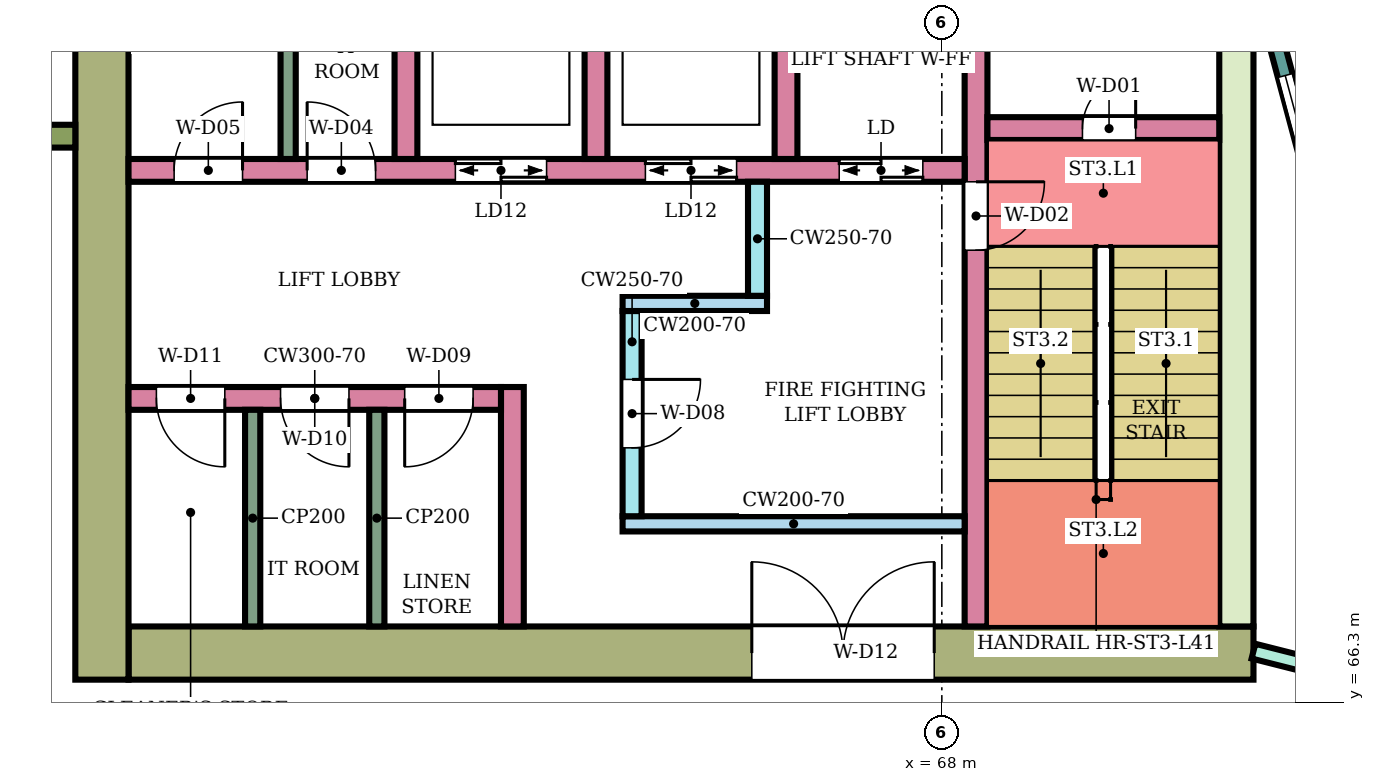
"""IFC4 building model, lengths in metres.
Left out: names, types, materials, properties, quantities, classifications, styles, units other than length and angle.
Written with IfcOpenShell. Run it as: python <this file> out.ifc"""

import sys

from ifc_helpers import new_model, si_unit, direction, frame, frame_2d, origin, place, context, subcontext, project, spatial, rectangle, extrude, element, fill, save


model = new_model("IFC4")
c1 = context("Model", 3, precision=1e-05, world=origin(), true_north=direction((0.0, 1.0)))
c2 = subcontext(c1, "Body", "Model", "MODEL_VIEW")
j1 = project(units=[si_unit("LENGTHUNIT", "METRE"), si_unit("PLANEANGLEUNIT", "RADIAN")], contexts=[c1])
p1 = place(None, origin())
s1 = spatial("IfcSite", under=j1, at=p1, CompositionType="ELEMENT")
p2 = place(p1, origin())
s2 = spatial("IfcBuilding", under=s1, at=p2, CompositionType="ELEMENT")
p3 = place(p2, frame((0.0, 0.0, 178.2)))
s3 = spatial("IfcBuildingStorey", under=s2, at=p3, CompositionType="ELEMENT", Elevation=178.2)
p4 = place(p3, frame((72.1, 66.95, 0.0), z_axis=(0.0, 0.0, 1.0), x_axis=(-1.0, 0.0, 0.0)))
e1 = element("IfcWall", 1, at=p4, inside=s3, PredefinedType="SHEAR", context=c2, shape_type="SweptSolid", body=[
    extrude(rectangle(XDim=14.8, YDim=0.7, at=frame_2d((7.4, 0.0))), origin(), (0.0, 0.0, 1.0), 3.78),
])
p5 = place(p4, frame((4.2, 0.0, 0.0)))
e2 = element("IfcOpeningElement", 2, at=p5, cuts=e1, PredefinedType="OPENING", context=c2, shape_type="SweptSolid", body=[
    extrude(rectangle(XDim=2.4, YDim=2.4, at=frame_2d((1.2, 1.2))), frame((0.0, 0.36, 0.0), z_axis=(0.0, -1.0, 0.0), x_axis=(1.0, 0.0, 0.0)), (0.0, 0.0, 1.0), 0.72),
])
p6 = place(p3, frame((71.875, 75.0, 0.0), z_axis=(0.0, 0.0, 1.0), x_axis=(0.0, -1.0, 0.0)))
e3 = element("IfcWall", 3, at=p6, inside=s3, PredefinedType="SHEAR", context=c2, shape_type="SweptSolid", body=[
    extrude(rectangle(XDim=7.7, YDim=0.45, at=frame_2d((3.85, 0.0))), origin(), (0.0, 0.0, 1.0), 3.78),
])
p7 = place(p3, frame((56.95, 83.4, 0.0), z_axis=(0.0, 0.0, 1.0), x_axis=(0.0, -1.0, 0.0)))
e4 = element("IfcWall", 4, at=p7, inside=s3, PredefinedType="SHEAR", context=c2, shape_type="SweptSolid", body=[
    extrude(rectangle(XDim=16.8, YDim=0.7, at=frame_2d((8.4, 0.0))), origin(), (0.0, 0.0, 1.0), 3.78),
])
p8 = place(p3, frame((68.45, 75.0, 0.0), z_axis=(0.0, 0.0, 1.0), x_axis=(0.0, -1.0, 0.0)))
e5 = element("IfcWall", 5, at=p8, inside=s3, PredefinedType="SHEAR", context=c2, shape_type="SweptSolid", body=[
    extrude(rectangle(XDim=7.7, YDim=0.3, at=frame_2d((3.85, 0.0))), origin(), (0.0, 0.0, 1.0), 3.78),
])
p9 = place(p8, frame((1.85, 0.0, 0.0)))
e6 = element("IfcOpeningElement", 6, at=p9, cuts=e5, PredefinedType="OPENING", context=c2, shape_type="SweptSolid", body=[
    extrude(rectangle(XDim=0.9, YDim=2.1, at=frame_2d((0.45, 1.05))), frame((0.0, 0.16, 0.0), z_axis=(0.0, -1.0, 0.0), x_axis=(1.0, 0.0, 0.0)), (0.0, 0.0, 1.0), 0.32),
])
p10 = place(p3, frame((71.65, 73.85, 0.0), z_axis=(0.0, 0.0, 1.0), x_axis=(-1.0, 0.0, 0.0)))
e7 = element("IfcWall", 7, at=p10, inside=s3, PredefinedType="SHEAR", context=c2, shape_type="SweptSolid", body=[
    extrude(rectangle(XDim=3.05, YDim=0.3, at=frame_2d((1.525, 0.0))), origin(), (0.0, 0.0, 1.0), 3.78),
])
p11 = place(p10, frame((1.1, 0.0, 0.0)))
e8 = element("IfcOpeningElement", 8, at=p11, cuts=e7, PredefinedType="OPENING", context=c2, shape_type="SweptSolid", body=[
    extrude(rectangle(XDim=0.7, YDim=2.0, at=frame_2d((0.35, 1.0))), frame((0.0, 0.16, 0.0), z_axis=(0.0, -1.0, 0.0), x_axis=(1.0, 0.0, 0.0)), (0.0, 0.0, 1.0), 0.32),
])
p12 = place(p3, frame((68.3, 73.3, 0.0), z_axis=(0.0, 0.0, 1.0), x_axis=(-1.0, 0.0, 0.0)))
e9 = element("IfcWall", 9, at=p12, inside=s3, PredefinedType="SHEAR", context=c2, shape_type="SweptSolid", body=[
    extrude(rectangle(XDim=11.0, YDim=0.3, at=frame_2d((5.5, 0.0))), origin(), (0.0, 0.0, 1.0), 3.78),
])
p13 = place(p12, frame((0.55, 0.0, 0.0)))
e10 = element("IfcOpeningElement", 10, at=p13, cuts=e9, PredefinedType="OPENING", context=c2, shape_type="SweptSolid", body=[
    extrude(rectangle(XDim=1.1, YDim=2.1, at=frame_2d((0.55, 1.05))), frame((0.0, 0.16, 0.0), z_axis=(0.0, -1.0, 0.0), x_axis=(1.0, 0.0, 0.0)), (0.0, 0.0, 1.0), 0.32),
])
p14 = place(p12, frame((3.0, 0.0, 0.0)))
e11 = element("IfcOpeningElement", 11, at=p14, cuts=e9, PredefinedType="OPENING", context=c2, shape_type="SweptSolid", body=[
    extrude(rectangle(XDim=1.2, YDim=2.1, at=frame_2d((0.6, 1.05))), frame((0.0, 0.16, 0.0), z_axis=(0.0, -1.0, 0.0), x_axis=(1.0, 0.0, 0.0)), (0.0, 0.0, 1.0), 0.32),
])
p15 = place(p12, frame((5.5, 0.0, 0.0)))
e12 = element("IfcOpeningElement", 12, at=p15, cuts=e9, PredefinedType="OPENING", context=c2, shape_type="SweptSolid", body=[
    extrude(rectangle(XDim=1.2, YDim=2.1, at=frame_2d((0.6, 1.05))), frame((0.0, 0.16, 0.0), z_axis=(0.0, -1.0, 0.0), x_axis=(1.0, 0.0, 0.0)), (0.0, 0.0, 1.0), 0.32),
])
p16 = place(p12, frame((7.75, 0.0, 0.0)))
e13 = element("IfcOpeningElement", 13, at=p16, cuts=e9, PredefinedType="OPENING", context=c2, shape_type="SweptSolid", body=[
    extrude(rectangle(XDim=0.9, YDim=2.1, at=frame_2d((0.45, 1.05))), frame((0.0, 0.16, 0.0), z_axis=(0.0, -1.0, 0.0), x_axis=(1.0, 0.0, 0.0)), (0.0, 0.0, 1.0), 0.32),
])
p17 = place(p12, frame((9.5, 0.0, 0.0)))
e14 = element("IfcOpeningElement", 14, at=p17, cuts=e9, PredefinedType="OPENING", context=c2, shape_type="SweptSolid", body=[
    extrude(rectangle(XDim=0.9, YDim=2.1, at=frame_2d((0.45, 1.05))), frame((0.0, 0.16, 0.0), z_axis=(0.0, -1.0, 0.0), x_axis=(1.0, 0.0, 0.0)), (0.0, 0.0, 1.0), 0.32),
])
for number, where, z_axis, x_axis in (
    (15, (65.95, 76.0, 0.0), (0.0, 0.0, 1.0), (0.0, -1.0, 0.0)),
    (16, (63.45, 76.0, 0.0), (0.0, 0.0, 1.0), (0.0, -1.0, 0.0)),
    (17, (60.95, 76.0, 0.0), (0.0, 0.0, 1.0), (0.0, -1.0, 0.0)),
):
    element("IfcWall", number, at=place(p3, frame(where, z_axis=z_axis, x_axis=x_axis)), inside=s3, PredefinedType="SHEAR", context=c2, shape_type="SweptSolid", body=[
        extrude(rectangle(XDim=2.55, YDim=0.3, at=frame_2d((1.275, 0.0))), origin(), (0.0, 0.0, 1.0), 3.78),
    ])
p18 = place(p3, frame((68.3, 68.65, 0.0), z_axis=(0.0, 0.0, 1.0), x_axis=(-1.0, 0.0, 0.0)))
e18 = element("IfcWall", 18, at=p18, inside=s3, PredefinedType="SHEAR", context=c2, shape_type="SweptSolid", body=[
    extrude(rectangle(XDim=4.5, YDim=0.2, at=frame_2d((2.25, 0.0))), origin(), (0.0, 0.0, 1.0), 3.78),
])
p19 = place(p3, frame((63.925, 71.45, 0.0), z_axis=(0.0, 0.0, 1.0), x_axis=(0.0, -1.0, 0.0)))
e19 = element("IfcWall", 19, at=p19, inside=s3, PredefinedType="SHEAR", context=c2, shape_type="SweptSolid", body=[
    extrude(rectangle(XDim=2.7, YDim=0.25, at=frame_2d((1.35, 0.0))), origin(), (0.0, 0.0, 1.0), 3.78),
])
p20 = place(p19, frame((0.9, 0.0, 0.0)))
e20 = element("IfcOpeningElement", 20, at=p20, cuts=e19, PredefinedType="OPENING", context=c2, shape_type="SweptSolid", body=[
    extrude(rectangle(XDim=0.9, YDim=2.1, at=frame_2d((0.45, 1.05))), frame((0.0, 0.135, 0.0), z_axis=(0.0, -1.0, 0.0), x_axis=(1.0, 0.0, 0.0)), (0.0, 0.0, 1.0), 0.27),
])
p21 = place(p3, frame((65.7, 71.55, 0.0), z_axis=(0.0, 0.0, 1.0), x_axis=(-1.0, 0.0, 0.0)))
e21 = element("IfcWall", 21, at=p21, inside=s3, PredefinedType="SHEAR", context=c2, shape_type="SweptSolid", body=[
    extrude(rectangle(XDim=1.9, YDim=0.2, at=frame_2d((0.95, 0.0))), origin(), (0.0, 0.0, 1.0), 3.78),
])
p22 = place(p3, frame((65.575, 73.15, 0.0), z_axis=(0.0, 0.0, 1.0), x_axis=(0.0, -1.0, 0.0)))
e22 = element("IfcWall", 22, at=p22, inside=s3, PredefinedType="SHEAR", context=c2, shape_type="SweptSolid", body=[
    extrude(rectangle(XDim=1.5, YDim=0.25, at=frame_2d((0.75, 0.0))), origin(), (0.0, 0.0, 1.0), 3.78),
])
p23 = place(p3, frame((62.35, 70.45, 0.0), z_axis=(0.0, 0.0, 1.0), x_axis=(0.0, -1.0, 0.0)))
e23 = element("IfcWall", 23, at=p23, inside=s3, PredefinedType="SHEAR", context=c2, shape_type="SweptSolid", body=[
    extrude(rectangle(XDim=3.15, YDim=0.3, at=frame_2d((1.575, 0.0))), origin(), (0.0, 0.0, 1.0), 3.78),
])
p24 = place(p3, frame((62.2, 70.3, 0.0), z_axis=(0.0, 0.0, 1.0), x_axis=(-1.0, 0.0, 0.0)))
e24 = element("IfcWall", 24, at=p24, inside=s3, PredefinedType="SHEAR", context=c2, shape_type="SweptSolid", body=[
    extrude(rectangle(XDim=4.9, YDim=0.3, at=frame_2d((2.45, 0.0))), origin(), (0.0, 0.0, 1.0), 3.78),
])
p25 = place(p24, frame((0.367, 0.0, 0.0)))
e25 = element("IfcOpeningElement", 25, at=p25, cuts=e24, PredefinedType="OPENING", context=c2, shape_type="SweptSolid", body=[
    extrude(rectangle(XDim=0.9, YDim=2.1, at=frame_2d((0.45, 1.05))), frame((0.0, 0.16, 0.0), z_axis=(0.0, -1.0, 0.0), x_axis=(1.0, 0.0, 0.0)), (0.0, 0.0, 1.0), 0.32),
])
p26 = place(p24, frame((2.0, 0.0, 0.0)))
e26 = element("IfcOpeningElement", 26, at=p26, cuts=e24, PredefinedType="OPENING", context=c2, shape_type="SweptSolid", body=[
    extrude(rectangle(XDim=0.9, YDim=2.1, at=frame_2d((0.45, 1.05))), frame((0.0, 0.16, 0.0), z_axis=(0.0, -1.0, 0.0), x_axis=(1.0, 0.0, 0.0)), (0.0, 0.0, 1.0), 0.32),
])
p27 = place(p24, frame((3.633, 0.0, 0.0)))
e27 = element("IfcOpeningElement", 27, at=p27, cuts=e24, PredefinedType="OPENING", context=c2, shape_type="SweptSolid", body=[
    extrude(rectangle(XDim=0.9, YDim=2.1, at=frame_2d((0.45, 1.05))), frame((0.0, 0.16, 0.0), z_axis=(0.0, -1.0, 0.0), x_axis=(1.0, 0.0, 0.0)), (0.0, 0.0, 1.0), 0.32),
])
p28 = place(p3, frame((56.6, 73.75, 0.0), z_axis=(0.0, 0.0, 1.0), x_axis=(-1.0, 0.0, 0.0)))
e28 = element("IfcWall", 28, at=p28, inside=s3, PredefinedType="NOTDEFINED", context=c2, shape_type="SweptSolid", body=[
    extrude(rectangle(XDim=2.416, YDim=0.3, at=frame_2d((1.208, 0.0))), origin(), (0.0, 0.0, 1.0), 4.1),
])
p29 = place(p3, frame((72.396, 75.0, 0.0), z_axis=(0.0, 0.0, 1.0), x_axis=(0.258789828301, -0.965933654434, 0.0)))
e29 = element("IfcWall", 29, at=p29, inside=s3, PredefinedType="NOTDEFINED", context=c2, shape_type="SweptSolid", body=[
    extrude(rectangle(XDim=3.936, YDim=0.2, at=frame_2d((1.968, 0.0))), origin(), (0.0, 0.0, 1.0), 4.1),
])
p30 = place(p29, frame((0.468, 0.0, 0.9)))
e30 = element("IfcOpeningElement", 30, at=p30, cuts=e29, PredefinedType="OPENING", context=c2, shape_type="SweptSolid", body=[
    extrude(rectangle(XDim=3.0, YDim=2.3, at=frame_2d((1.5, 1.15))), frame((0.0, 0.11, 0.0), z_axis=(0.0, -1.0, 0.0), x_axis=(1.0, 0.0, 0.0)), (0.0, 0.0, 1.0), 0.22),
])
p31 = place(p3, frame((72.1, 66.975, 0.0), z_axis=(0.0, 0.0, 1.0), x_axis=(0.969471314457, -0.245204752086, 0.0)))
e31 = element("IfcWall", 31, at=p31, inside=s3, PredefinedType="PARTITIONING", context=c2, shape_type="SweptSolid", body=[
    extrude(rectangle(XDim=2.582, YDim=0.2, at=frame_2d((1.291, 0.0))), origin(), (0.0, 0.0, 1.0), 3.65),
])
p32 = place(p31, frame((0.841, 0.0, 0.0)))
e32 = element("IfcOpeningElement", 32, at=p32, cuts=e31, PredefinedType="OPENING", context=c2, shape_type="SweptSolid", body=[
    extrude(rectangle(XDim=0.9, YDim=2.1, at=frame_2d((0.45, 1.05))), frame((0.0, 0.11, 0.0), z_axis=(0.0, -1.0, 0.0), x_axis=(1.0, 0.0, 0.0)), (0.0, 0.0, 1.0), 0.22),
])
p33 = place(p3, frame((59.4, 76.0, 0.0), z_axis=(0.0, 0.0, 1.0), x_axis=(0.0, -1.0, 0.0)))
e33 = element("IfcWall", 33, at=p33, inside=s3, PredefinedType="PARTITIONING", context=c2, shape_type="SweptSolid", body=[
    extrude(rectangle(XDim=2.55, YDim=0.2, at=frame_2d((1.275, 0.0))), origin(), (0.0, 0.0, 1.0), 3.78),
])
for number, where, z_axis, x_axis in (
    (34, (60.567, 70.15, 0.0), (0.0, 0.0, 1.0), (0.0, -1.0, 0.0)),
    (35, (58.933, 70.15, 0.0), (0.0, 0.0, 1.0), (0.0, -1.0, 0.0)),
):
    element("IfcWall", number, at=place(p3, frame(where, z_axis=z_axis, x_axis=x_axis)), inside=s3, PredefinedType="PARTITIONING", context=c2, shape_type="SweptSolid", body=[
        extrude(rectangle(XDim=2.85, YDim=0.2, at=frame_2d((1.425, 0.0))), origin(), (0.0, 0.0, 1.0), 3.78),
    ])
p34 = place(p30, origin())
e36 = element("IfcWindow", 36, at=p34, inside=s3, PartitioningType="SINGLE_PANEL", PredefinedType="WINDOW", context=c2, shape_type="SweptSolid", body=[
    extrude(rectangle(XDim=3.0, YDim=2.3, at=frame_2d((1.5, 1.15))), frame((0.0, 0.03, 0.0), z_axis=(0.0, -1.0, 0.0), x_axis=(1.0, 0.0, 0.0)), (0.0, 0.0, 1.0), 0.06),
])
fill(e30, e36)
p35 = place(p11, frame((0.7, 0.0, 0.0), z_axis=(0.0, 0.0, 1.0), x_axis=(-1.0, 0.0, 0.0)))
e37 = element("IfcDoor", 37, at=p35, inside=s3, OperationType="SINGLE_SWING_RIGHT", PredefinedType="DOOR", context=c2, shape_type="SweptSolid", body=[
    extrude(rectangle(XDim=0.7, YDim=2.0, at=frame_2d((0.35, 1.0))), frame((0.0, 0.025, 0.0), z_axis=(0.0, -1.0, 0.0), x_axis=(1.0, 0.0, 0.0)), (0.0, 0.0, 1.0), 0.05),
])
fill(e8, e37)
p36 = place(p9, origin())
e38 = element("IfcDoor", 38, at=p36, inside=s3, OperationType="SINGLE_SWING_LEFT", PredefinedType="DOOR", context=c2, shape_type="SweptSolid", body=[
    extrude(rectangle(XDim=0.9, YDim=2.1, at=frame_2d((0.45, 1.05))), frame((0.0, 0.025, 0.0), z_axis=(0.0, -1.0, 0.0), x_axis=(1.0, 0.0, 0.0)), (0.0, 0.0, 1.0), 0.05),
])
fill(e6, e38)
p37 = place(p13, origin())
e39 = element("IfcDoor", 39, at=p37, inside=s3, OperationType="DOUBLE_DOOR_SLIDING", PredefinedType="DOOR", context=c2, shape_type="SweptSolid", body=[
    extrude(rectangle(XDim=1.1, YDim=2.1, at=frame_2d((0.55, 1.05))), frame((0.0, 0.025, 0.0), z_axis=(0.0, -1.0, 0.0), x_axis=(1.0, 0.0, 0.0)), (0.0, 0.0, 1.0), 0.05),
])
fill(e10, e39)
p38 = place(p14, origin())
e40 = element("IfcDoor", 40, at=p38, inside=s3, OperationType="DOUBLE_DOOR_SLIDING", PredefinedType="DOOR", context=c2, shape_type="SweptSolid", body=[
    extrude(rectangle(XDim=1.2, YDim=2.1, at=frame_2d((0.6, 1.05))), frame((0.0, 0.025, 0.0), z_axis=(0.0, -1.0, 0.0), x_axis=(1.0, 0.0, 0.0)), (0.0, 0.0, 1.0), 0.05),
])
fill(e11, e40)
p39 = place(p15, origin())
e41 = element("IfcDoor", 41, at=p39, inside=s3, OperationType="DOUBLE_DOOR_SLIDING", PredefinedType="DOOR", context=c2, shape_type="SweptSolid", body=[
    extrude(rectangle(XDim=1.2, YDim=2.1, at=frame_2d((0.6, 1.05))), frame((0.0, 0.025, 0.0), z_axis=(0.0, -1.0, 0.0), x_axis=(1.0, 0.0, 0.0)), (0.0, 0.0, 1.0), 0.05),
])
fill(e12, e41)
p40 = place(p16, frame((0.9, 0.0, 0.0), z_axis=(0.0, 0.0, 1.0), x_axis=(-1.0, 0.0, 0.0)))
e42 = element("IfcDoor", 42, at=p40, inside=s3, OperationType="SINGLE_SWING_LEFT", PredefinedType="DOOR", context=c2, shape_type="SweptSolid", body=[
    extrude(rectangle(XDim=0.9, YDim=2.1, at=frame_2d((0.45, 1.05))), frame((0.0, 0.025, 0.0), z_axis=(0.0, -1.0, 0.0), x_axis=(1.0, 0.0, 0.0)), (0.0, 0.0, 1.0), 0.05),
])
fill(e13, e42)
p41 = place(p17, frame((0.9, 0.0, 0.0), z_axis=(0.0, 0.0, 1.0), x_axis=(-1.0, 0.0, 0.0)))
e43 = element("IfcDoor", 43, at=p41, inside=s3, OperationType="SINGLE_SWING_RIGHT", PredefinedType="DOOR", context=c2, shape_type="SweptSolid", body=[
    extrude(rectangle(XDim=0.9, YDim=2.1, at=frame_2d((0.45, 1.05))), frame((0.0, 0.025, 0.0), z_axis=(0.0, -1.0, 0.0), x_axis=(1.0, 0.0, 0.0)), (0.0, 0.0, 1.0), 0.05),
])
fill(e14, e43)
p42 = place(p20, origin())
e44 = element("IfcDoor", 44, at=p42, inside=s3, OperationType="SINGLE_SWING_LEFT", PredefinedType="DOOR", context=c2, shape_type="SweptSolid", body=[
    extrude(rectangle(XDim=0.9, YDim=2.1, at=frame_2d((0.45, 1.05))), frame((0.0, 0.025, 0.0), z_axis=(0.0, -1.0, 0.0), x_axis=(1.0, 0.0, 0.0)), (0.0, 0.0, 1.0), 0.05),
])
fill(e20, e44)
p43 = place(p25, origin())
e45 = element("IfcDoor", 45, at=p43, inside=s3, OperationType="SINGLE_SWING_RIGHT", PredefinedType="DOOR", context=c2, shape_type="SweptSolid", body=[
    extrude(rectangle(XDim=0.9, YDim=2.1, at=frame_2d((0.45, 1.05))), frame((0.0, 0.025, 0.0), z_axis=(0.0, -1.0, 0.0), x_axis=(1.0, 0.0, 0.0)), (0.0, 0.0, 1.0), 0.05),
])
fill(e25, e45)
p44 = place(p26, origin())
e46 = element("IfcDoor", 46, at=p44, inside=s3, OperationType="SINGLE_SWING_LEFT", PredefinedType="DOOR", context=c2, shape_type="SweptSolid", body=[
    extrude(rectangle(XDim=0.9, YDim=2.1, at=frame_2d((0.45, 1.05))), frame((0.0, 0.025, 0.0), z_axis=(0.0, -1.0, 0.0), x_axis=(1.0, 0.0, 0.0)), (0.0, 0.0, 1.0), 0.05),
])
fill(e26, e46)
p45 = place(p27, origin())
e47 = element("IfcDoor", 47, at=p45, inside=s3, OperationType="SINGLE_SWING_LEFT", PredefinedType="DOOR", context=c2, shape_type="SweptSolid", body=[
    extrude(rectangle(XDim=0.9, YDim=2.1, at=frame_2d((0.45, 1.05))), frame((0.0, 0.025, 0.0), z_axis=(0.0, -1.0, 0.0), x_axis=(1.0, 0.0, 0.0)), (0.0, 0.0, 1.0), 0.05),
])
fill(e27, e47)
p46 = place(p5, frame((2.4, 0.0, 0.0), z_axis=(0.0, 0.0, 1.0), x_axis=(-1.0, 0.0, 0.0)))
e48 = element("IfcDoor", 48, at=p46, inside=s3, OperationType="DOUBLE_DOOR_SINGLE_SWING", PredefinedType="DOOR", context=c2, shape_type="SweptSolid", body=[
    extrude(rectangle(XDim=2.4, YDim=2.4, at=frame_2d((1.2, 1.2))), frame((0.0, 0.025, 0.0), z_axis=(0.0, -1.0, 0.0), x_axis=(1.0, 0.0, 0.0)), (0.0, 0.0, 1.0), 0.05),
])
fill(e2, e48)
save(model, sys.argv[1])
